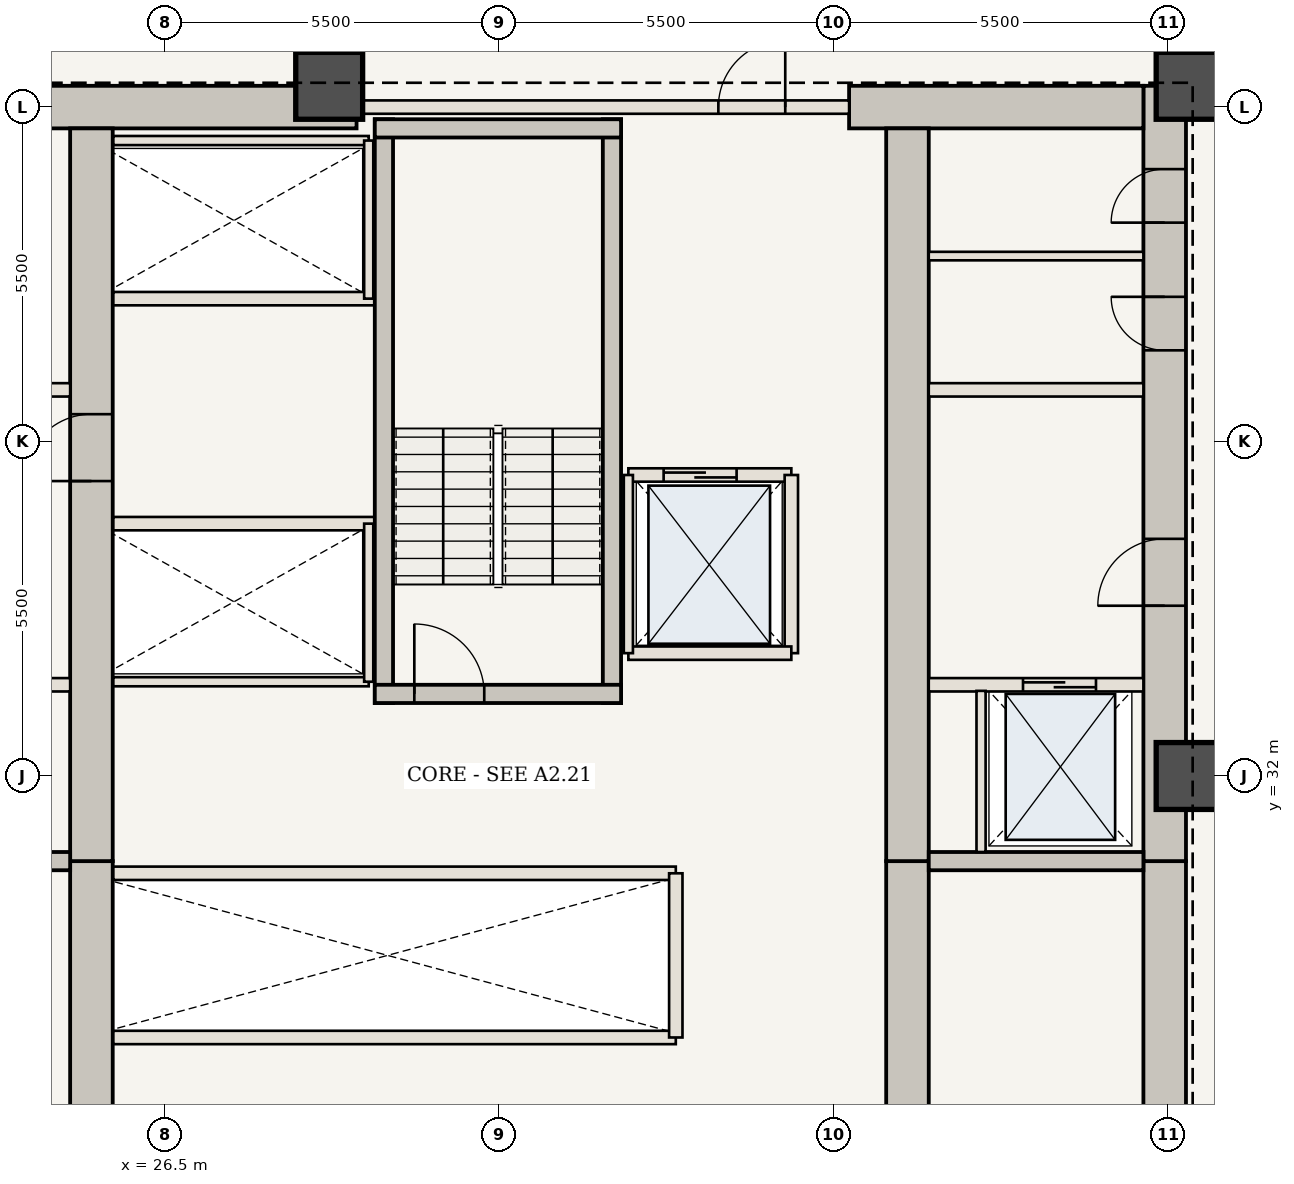
"""IFC4 building model, lengths in metres.
Left out: names, types, materials, properties, quantities, classifications, styles, units other than length and angle.
Written with IfcOpenShell. Run it as: python <this file> out.ifc"""

import sys

from ifc_helpers import new_model, si_unit, direction, frame, frame_2d, origin, origin_2d, place, context, subcontext, project, spatial, rectangle, extrude, element, fill, save


model = new_model("IFC4")
c1 = context("Model", 3, precision=1e-05, world=origin(), true_north=direction((0.0, 1.0)))
c2 = subcontext(c1, "Body", "Model", "MODEL_VIEW")
j1 = project(units=[si_unit("LENGTHUNIT", "METRE"), si_unit("PLANEANGLEUNIT", "RADIAN")], contexts=[c1])
p1 = place(None, origin())
s1 = spatial("IfcSite", under=j1, at=p1, CompositionType="ELEMENT")
p2 = place(p1, origin())
s2 = spatial("IfcBuilding", under=s1, at=p2, CompositionType="ELEMENT")
p3 = place(p2, frame((0.0, 0.0, 82.25)))
s3 = spatial("IfcBuildingStorey", under=s2, at=p3, CompositionType="ELEMENT", Elevation=82.25)
p4 = place(p3, frame((42.94, 20.6, 0.0), z_axis=(0.0, 0.0, 1.0), x_axis=(0.0, 1.0, 0.0)))
e1 = element("IfcWall", 1, at=p4, inside=s3, PredefinedType="SHEAR", context=c2, shape_type="SweptSolid", body=[
    extrude(rectangle(XDim=10.0, YDim=0.7, at=frame_2d((5.0, 0.0))), origin(), (0.0, 0.0, 1.0), 3.5),
])
p5 = place(p4, frame((1.15, 0.0, 0.0)))
e2 = element("IfcOpeningElement", 2, at=p5, cuts=e1, PredefinedType="OPENING", context=c2, shape_type="SweptSolid", body=[
    extrude(rectangle(XDim=1.15, YDim=2.15, at=frame_2d((0.575, 1.075))), frame((0.0, 0.36, 0.0), z_axis=(0.0, -1.0, 0.0), x_axis=(1.0, 0.0, 0.0)), (0.0, 0.0, 1.0), 0.72),
])
p6 = place(p3, frame((42.94, 30.6, 0.0), z_axis=(0.0, 0.0, 1.0), x_axis=(0.0, 1.0, 0.0)))
e3 = element("IfcWall", 3, at=p6, inside=s3, PredefinedType="SHEAR", context=c2, shape_type="SweptSolid", body=[
    extrude(rectangle(XDim=12.75, YDim=0.7, at=frame_2d((6.375, 0.0))), origin(), (0.0, 0.0, 1.0), 3.5),
])
p7 = place(p6, frame((4.2, 0.0, 0.0)))
e4 = element("IfcOpeningElement", 4, at=p7, cuts=e3, PredefinedType="OPENING", context=c2, shape_type="SweptSolid", body=[
    extrude(rectangle(XDim=1.1, YDim=2.15, at=frame_2d((0.55, 1.075))), frame((0.0, 0.36, 0.0), z_axis=(0.0, -1.0, 0.0), x_axis=(1.0, 0.0, 0.0)), (0.0, 0.0, 1.0), 0.72),
])
p8 = place(p6, frame((8.4, 0.0, 0.0)))
e5 = element("IfcOpeningElement", 5, at=p8, cuts=e3, PredefinedType="OPENING", context=c2, shape_type="SweptSolid", body=[
    extrude(rectangle(XDim=0.88, YDim=2.1, at=frame_2d((0.44, 1.05))), frame((0.0, 0.36, 0.0), z_axis=(0.0, -1.0, 0.0), x_axis=(1.0, 0.0, 0.0)), (0.0, 0.0, 1.0), 0.72),
])
p9 = place(p6, frame((10.5, 0.0, 0.0)))
e6 = element("IfcOpeningElement", 6, at=p9, cuts=e3, PredefinedType="OPENING", context=c2, shape_type="SweptSolid", body=[
    extrude(rectangle(XDim=0.88, YDim=2.1, at=frame_2d((0.44, 1.05))), frame((0.0, 0.36, 0.0), z_axis=(0.0, -1.0, 0.0), x_axis=(1.0, 0.0, 0.0)), (0.0, 0.0, 1.0), 0.72),
])
p10 = place(p3, frame((21.41, 43.0, 0.0), z_axis=(0.0, 0.0, 1.0), x_axis=(1.0, 0.0, 0.0)))
e7 = element("IfcWall", 7, at=p10, inside=s3, PredefinedType="SHEAR", context=c2, shape_type="SweptSolid", body=[
    extrude(rectangle(XDim=8.24, YDim=0.7, at=frame_2d((4.12, 0.0))), origin(), (0.0, 0.0, 1.0), 3.5),
])
p11 = place(p3, frame((37.75, 43.0, 0.0), z_axis=(0.0, 0.0, 1.0), x_axis=(1.0, 0.0, 0.0)))
e8 = element("IfcWall", 8, at=p11, inside=s3, PredefinedType="SHEAR", context=c2, shape_type="SweptSolid", body=[
    extrude(rectangle(XDim=4.84, YDim=0.7, at=frame_2d((2.42, 0.0))), origin(), (0.0, 0.0, 1.0), 3.5),
])
p12 = place(p3, frame((25.29, 21.3, 0.0), z_axis=(0.0, 0.0, 1.0), x_axis=(0.0, 1.0, 0.0)))
e9 = element("IfcWall", 9, at=p12, inside=s3, PredefinedType="SHEAR", context=c2, shape_type="SweptSolid", body=[
    extrude(rectangle(XDim=9.3, YDim=0.7, at=frame_2d((4.65, 0.0))), origin(), (0.0, 0.0, 1.0), 3.5),
])
p13 = place(p3, frame((25.29, 30.6, 0.0), z_axis=(0.0, 0.0, 1.0), x_axis=(0.0, 1.0, 0.0)))
e10 = element("IfcWall", 10, at=p13, inside=s3, PredefinedType="SHEAR", context=c2, shape_type="SweptSolid", body=[
    extrude(rectangle(XDim=12.05, YDim=0.7, at=frame_2d((6.025, 0.0))), origin(), (0.0, 0.0, 1.0), 3.5),
])
p14 = place(p13, frame((6.25, 0.0, 0.0)))
e11 = element("IfcOpeningElement", 11, at=p14, cuts=e10, PredefinedType="OPENING", context=c2, shape_type="SweptSolid", body=[
    extrude(rectangle(XDim=1.1, YDim=2.15, at=frame_2d((0.55, 1.075))), frame((0.0, 0.36, 0.0), z_axis=(0.0, -1.0, 0.0), x_axis=(1.0, 0.0, 0.0)), (0.0, 0.0, 1.0), 0.72),
])
p15 = place(p3, frame((38.71, 21.3, 0.0), z_axis=(0.0, 0.0, 1.0), x_axis=(0.0, 1.0, 0.0)))
e12 = element("IfcWall", 12, at=p15, inside=s3, PredefinedType="SHEAR", context=c2, shape_type="SweptSolid", body=[
    extrude(rectangle(XDim=9.3, YDim=0.7, at=frame_2d((4.65, 0.0))), origin(), (0.0, 0.0, 1.0), 3.5),
])
p16 = place(p3, frame((38.71, 30.6, 0.0), z_axis=(0.0, 0.0, 1.0), x_axis=(0.0, 1.0, 0.0)))
e13 = element("IfcWall", 13, at=p16, inside=s3, PredefinedType="SHEAR", context=c2, shape_type="SweptSolid", body=[
    extrude(rectangle(XDim=12.05, YDim=0.7, at=frame_2d((6.025, 0.0))), origin(), (0.0, 0.0, 1.0), 3.5),
])
for number, where, z_axis, x_axis in (
    (14, (43.35, 32.0, 0.0), (0.0, 0.0, 1.0), (1.0, 0.0, 0.0)),
    (15, (43.35, 43.35, 0.0), (0.0, 0.0, 1.0), (1.0, 0.0, 0.0)),
    (16, (29.2, 43.35, 0.0), (0.0, 0.0, 1.0), (1.0, 0.0, 0.0)),
):
    element("IfcColumn", number, at=place(p3, frame(where, z_axis=z_axis, x_axis=x_axis)), inside=s3, PredefinedType="COLUMN", context=c2, shape_type="SweptSolid", body=[
        extrude(rectangle(XDim=1.1, YDim=1.1, at=origin_2d()), origin(), (0.0, 0.0, 1.0), 3.5),
    ])
for number, where, z_axis, x_axis in (
    (17, (21.41, 30.6, 0.0), (0.0, 0.0, 1.0), (1.0, 0.0, 0.0)),
    (18, (39.06, 30.6, 0.0), (0.0, 0.0, 1.0), (1.0, 0.0, 0.0)),
):
    element("IfcWall", number, at=place(p3, frame(where, z_axis=z_axis, x_axis=x_axis)), inside=s3, PredefinedType="SHEAR", context=c2, shape_type="SweptSolid", body=[
        extrude(rectangle(XDim=3.53, YDim=0.3, at=frame_2d((1.765, 0.0))), origin(), (0.0, 0.0, 1.0), 3.32),
    ])
p17 = place(p3, frame((21.41, 33.5, 0.0), z_axis=(0.0, 0.0, 1.0), x_axis=(1.0, 0.0, 0.0)))
e19 = element("IfcWall", 19, at=p17, inside=s3, PredefinedType="STANDARD", context=c2, shape_type="SweptSolid", body=[
    extrude(rectangle(XDim=3.53, YDim=0.22, at=frame_2d((1.765, 0.0))), origin(), (0.0, 0.0, 1.0), 3.32),
])
p18 = place(p17, frame((0.75, 0.0, 0.0)))
e20 = element("IfcOpeningElement", 20, at=p18, cuts=e19, PredefinedType="OPENING", context=c2, shape_type="SweptSolid", body=[
    extrude(rectangle(XDim=1.2, YDim=2.2, at=frame_2d((0.6, 1.1))), frame((0.0, 0.12, 0.0), z_axis=(0.0, -1.0, 0.0), x_axis=(1.0, 0.0, 0.0)), (0.0, 0.0, 1.0), 0.24),
])
p19 = place(p3, frame((39.06, 33.5, 0.0), z_axis=(0.0, 0.0, 1.0), x_axis=(1.0, 0.0, 0.0)))
e21 = element("IfcWall", 21, at=p19, inside=s3, PredefinedType="STANDARD", context=c2, shape_type="SweptSolid", body=[
    extrude(rectangle(XDim=3.53, YDim=0.22, at=frame_2d((1.765, 0.0))), origin(), (0.0, 0.0, 1.0), 3.32),
])
p20 = place(p19, frame((1.55, 0.0, 0.0)))
e22 = element("IfcOpeningElement", 22, at=p20, cuts=e21, PredefinedType="OPENING", context=c2, shape_type="SweptSolid", body=[
    extrude(rectangle(XDim=1.2, YDim=2.2, at=frame_2d((0.6, 1.1))), frame((0.0, 0.12, 0.0), z_axis=(0.0, -1.0, 0.0), x_axis=(1.0, 0.0, 0.0)), (0.0, 0.0, 1.0), 0.24),
])
p21 = place(p3, frame((39.92, 30.75, 0.0), z_axis=(0.0, 0.0, 1.0), x_axis=(0.0, 1.0, 0.0)))
e23 = element("IfcWall", 23, at=p21, inside=s3, PredefinedType="STANDARD", context=c2, shape_type="SweptSolid", body=[
    extrude(rectangle(XDim=2.65, YDim=0.15, at=frame_2d((1.325, 0.0))), origin(), (0.0, 0.0, 1.0), 3.32),
])
for number, where, z_axis, x_axis in (
    (24, (21.41, 38.35, 0.0), (0.0, 0.0, 1.0), (1.0, 0.0, 0.0)),
    (25, (39.06, 38.35, 0.0), (0.0, 0.0, 1.0), (1.0, 0.0, 0.0)),
):
    element("IfcWall", number, at=place(p3, frame(where, z_axis=z_axis, x_axis=x_axis)), inside=s3, PredefinedType="STANDARD", context=c2, shape_type="SweptSolid", body=[
        extrude(rectangle(XDim=3.53, YDim=0.22, at=frame_2d((1.765, 0.0))), origin(), (0.0, 0.0, 1.0), 3.32),
    ])
p22 = place(p3, frame((39.06, 40.55, 0.0), z_axis=(0.0, 0.0, 1.0), x_axis=(1.0, 0.0, 0.0)))
e26 = element("IfcWall", 26, at=p22, inside=s3, PredefinedType="STANDARD", context=c2, shape_type="SweptSolid", body=[
    extrude(rectangle(XDim=3.53, YDim=0.14, at=frame_2d((1.765, 0.0))), origin(), (0.0, 0.0, 1.0), 3.32),
])
for number, where, z_axis, x_axis in (
    (27, (25.65, 27.7, 0.0), (0.0, 0.0, 1.0), (1.0, 0.0, 0.0)),
    (28, (25.65, 30.4, 0.0), (0.0, 0.0, 1.0), (1.0, 0.0, 0.0)),
):
    element("IfcWall", number, at=place(p3, frame(where, z_axis=z_axis, x_axis=x_axis)), inside=s3, PredefinedType="STANDARD", context=c2, shape_type="SweptSolid", body=[
        extrude(rectangle(XDim=9.25, YDim=0.22, at=frame_2d((4.625, 0.0))), origin(), (0.0, 0.0, 1.0), 3.32),
    ])
p23 = place(p3, frame((34.9, 27.7, 0.0), z_axis=(0.0, 0.0, 1.0), x_axis=(0.0, 1.0, 0.0)))
e29 = element("IfcWall", 29, at=p23, inside=s3, PredefinedType="STANDARD", context=c2, shape_type="SweptSolid", body=[
    extrude(rectangle(XDim=2.7, YDim=0.22, at=frame_2d((1.35, 0.0))), origin(), (0.0, 0.0, 1.0), 3.32),
])
p24 = place(p3, frame((25.65, 36.15, 0.0), z_axis=(0.0, 0.0, 1.0), x_axis=(1.0, 0.0, 0.0)))
e30 = element("IfcWall", 30, at=p24, inside=s3, PredefinedType="STANDARD", context=c2, shape_type="SweptSolid", body=[
    extrude(rectangle(XDim=4.3, YDim=0.22, at=frame_2d((2.15, 0.0))), origin(), (0.0, 0.0, 1.0), 3.32),
])
p25 = place(p3, frame((25.65, 33.55, 0.0), z_axis=(0.0, 0.0, 1.0), x_axis=(1.0, 0.0, 0.0)))
e31 = element("IfcWall", 31, at=p25, inside=s3, PredefinedType="STANDARD", context=c2, shape_type="SweptSolid", body=[
    extrude(rectangle(XDim=4.2, YDim=0.15, at=frame_2d((2.1, 0.0))), origin(), (0.0, 0.0, 1.0), 3.32),
])
p26 = place(p3, frame((29.85, 33.55, 0.0), z_axis=(0.0, 0.0, 1.0), x_axis=(0.0, 1.0, 0.0)))
e32 = element("IfcWall", 32, at=p26, inside=s3, PredefinedType="STANDARD", context=c2, shape_type="SweptSolid", body=[
    extrude(rectangle(XDim=2.6, YDim=0.15, at=frame_2d((1.3, 0.0))), origin(), (0.0, 0.0, 1.0), 3.32),
])
p27 = place(p3, frame((25.65, 39.85, 0.0), z_axis=(0.0, 0.0, 1.0), x_axis=(1.0, 0.0, 0.0)))
e33 = element("IfcWall", 33, at=p27, inside=s3, PredefinedType="STANDARD", context=c2, shape_type="SweptSolid", body=[
    extrude(rectangle(XDim=4.3, YDim=0.22, at=frame_2d((2.15, 0.0))), origin(), (0.0, 0.0, 1.0), 3.32),
])
p28 = place(p3, frame((25.65, 42.45, 0.0), z_axis=(0.0, 0.0, 1.0), x_axis=(1.0, 0.0, 0.0)))
e34 = element("IfcWall", 34, at=p28, inside=s3, PredefinedType="STANDARD", context=c2, shape_type="SweptSolid", body=[
    extrude(rectangle(XDim=4.2, YDim=0.15, at=frame_2d((2.1, 0.0))), origin(), (0.0, 0.0, 1.0), 3.32),
])
p29 = place(p3, frame((29.85, 39.85, 0.0), z_axis=(0.0, 0.0, 1.0), x_axis=(0.0, 1.0, 0.0)))
e35 = element("IfcWall", 35, at=p29, inside=s3, PredefinedType="STANDARD", context=c2, shape_type="SweptSolid", body=[
    extrude(rectangle(XDim=2.6, YDim=0.15, at=frame_2d((1.3, 0.0))), origin(), (0.0, 0.0, 1.0), 3.32),
])
for number, where, z_axis, x_axis in (
    (36, (30.1, 33.2, 0.0), (0.0, 0.0, 1.0), (0.0, 1.0, 0.0)),
    (37, (33.85, 33.2, 0.0), (0.0, 0.0, 1.0), (0.0, 1.0, 0.0)),
):
    element("IfcWall", number, at=place(p3, frame(where, z_axis=z_axis, x_axis=x_axis)), inside=s3, PredefinedType="SHEAR", context=c2, shape_type="SweptSolid", body=[
        extrude(rectangle(XDim=9.6, YDim=0.3, at=frame_2d((4.8, 0.0))), origin(), (0.0, 0.0, 1.0), 3.32),
    ])
p30 = place(p3, frame((29.95, 33.35, 0.0), z_axis=(0.0, 0.0, 1.0), x_axis=(1.0, 0.0, 0.0)))
e38 = element("IfcWall", 38, at=p30, inside=s3, PredefinedType="SHEAR", context=c2, shape_type="SweptSolid", body=[
    extrude(rectangle(XDim=4.05, YDim=0.3, at=frame_2d((2.025, 0.0))), origin(), (0.0, 0.0, 1.0), 3.32),
])
p31 = place(p30, frame((0.65, 0.0, 0.0)))
e39 = element("IfcOpeningElement", 39, at=p31, cuts=e38, PredefinedType="OPENING", context=c2, shape_type="SweptSolid", body=[
    extrude(rectangle(XDim=1.15, YDim=2.15, at=frame_2d((0.575, 1.075))), frame((0.0, 0.16, 0.0), z_axis=(0.0, -1.0, 0.0), x_axis=(1.0, 0.0, 0.0)), (0.0, 0.0, 1.0), 0.32),
])
p32 = place(p3, frame((29.95, 42.65, 0.0), z_axis=(0.0, 0.0, 1.0), x_axis=(1.0, 0.0, 0.0)))
e40 = element("IfcWall", 40, at=p32, inside=s3, PredefinedType="SHEAR", context=c2, shape_type="SweptSolid", body=[
    extrude(rectangle(XDim=4.05, YDim=0.3, at=frame_2d((2.025, 0.0))), origin(), (0.0, 0.0, 1.0), 3.32),
])
p33 = place(p3, frame((29.65, 43.0, 0.0), z_axis=(0.0, 0.0, 1.0), x_axis=(1.0, 0.0, 0.0)))
e41 = element("IfcWall", 41, at=p33, inside=s3, PredefinedType="STANDARD", context=c2, shape_type="SweptSolid", body=[
    extrude(rectangle(XDim=8.1, YDim=0.22, at=frame_2d((4.05, 0.0))), origin(), (0.0, 0.0, 1.0), 3.32),
])
p34 = place(p33, frame((5.95, 0.0, 0.0)))
e42 = element("IfcOpeningElement", 42, at=p34, cuts=e41, PredefinedType="OPENING", context=c2, shape_type="SweptSolid", body=[
    extrude(rectangle(XDim=1.1, YDim=2.15, at=frame_2d((0.55, 1.075))), frame((0.0, 0.12, 0.0), z_axis=(0.0, -1.0, 0.0), x_axis=(1.0, 0.0, 0.0)), (0.0, 0.0, 1.0), 0.24),
])
p35 = place(p3, frame((34.12, 36.95, 0.0), z_axis=(0.0, 0.0, 1.0), x_axis=(1.0, 0.0, 0.0)))
e43 = element("IfcWall", 43, at=p35, inside=s3, PredefinedType="STANDARD", context=c2, shape_type="SweptSolid", body=[
    extrude(rectangle(XDim=2.68, YDim=0.22, at=frame_2d((1.34, 0.0))), origin(), (0.0, 0.0, 1.0), 3.32),
])
p36 = place(p35, frame((0.58, 0.0, 0.0)))
e44 = element("IfcOpeningElement", 44, at=p36, cuts=e43, PredefinedType="OPENING", context=c2, shape_type="SweptSolid", body=[
    extrude(rectangle(XDim=1.2, YDim=2.2, at=frame_2d((0.6, 1.1))), frame((0.0, 0.12, 0.0), z_axis=(0.0, -1.0, 0.0), x_axis=(1.0, 0.0, 0.0)), (0.0, 0.0, 1.0), 0.24),
])
p37 = place(p3, frame((36.8, 34.02, 0.0), z_axis=(0.0, 0.0, 1.0), x_axis=(0.0, 1.0, 0.0)))
e45 = element("IfcWall", 45, at=p37, inside=s3, PredefinedType="STANDARD", context=c2, shape_type="SweptSolid", body=[
    extrude(rectangle(XDim=2.93, YDim=0.22, at=frame_2d((1.465, 0.0))), origin(), (0.0, 0.0, 1.0), 3.32),
])
p38 = place(p3, frame((34.12, 34.02, 0.0), z_axis=(0.0, 0.0, 1.0), x_axis=(1.0, 0.0, 0.0)))
e46 = element("IfcWall", 46, at=p38, inside=s3, PredefinedType="STANDARD", context=c2, shape_type="SweptSolid", body=[
    extrude(rectangle(XDim=2.68, YDim=0.22, at=frame_2d((1.34, 0.0))), origin(), (0.0, 0.0, 1.0), 3.32),
])
p39 = place(p3, frame((34.12, 34.02, 0.0), z_axis=(0.0, 0.0, 1.0), x_axis=(0.0, 1.0, 0.0)))
e47 = element("IfcWall", 47, at=p39, inside=s3, PredefinedType="STANDARD", context=c2, shape_type="SweptSolid", body=[
    extrude(rectangle(XDim=2.93, YDim=0.15, at=frame_2d((1.465, 0.0))), origin(), (0.0, 0.0, 1.0), 3.32),
])
p40 = place(p7, origin())
e48 = element("IfcDoor", 48, at=p40, inside=s3, OperationType="SINGLE_SWING_LEFT", PredefinedType="DOOR", context=c2, shape_type="SweptSolid", body=[
    extrude(rectangle(XDim=1.1, YDim=2.15, at=frame_2d((0.55, 1.075))), frame((0.0, 0.025, 0.0), z_axis=(0.0, -1.0, 0.0), x_axis=(1.0, 0.0, 0.0)), (0.0, 0.0, 1.0), 0.05),
])
fill(e4, e48)
p41 = place(p14, origin())
e49 = element("IfcDoor", 49, at=p41, inside=s3, OperationType="SINGLE_SWING_LEFT", PredefinedType="DOOR", context=c2, shape_type="SweptSolid", body=[
    extrude(rectangle(XDim=1.1, YDim=2.15, at=frame_2d((0.55, 1.075))), frame((0.0, 0.025, 0.0), z_axis=(0.0, -1.0, 0.0), x_axis=(1.0, 0.0, 0.0)), (0.0, 0.0, 1.0), 0.05),
])
fill(e11, e49)
p42 = place(p8, origin())
e50 = element("IfcDoor", 50, at=p42, inside=s3, OperationType="SINGLE_SWING_RIGHT", PredefinedType="DOOR", context=c2, shape_type="SweptSolid", body=[
    extrude(rectangle(XDim=0.88, YDim=2.1, at=frame_2d((0.44, 1.05))), frame((0.0, 0.025, 0.0), z_axis=(0.0, -1.0, 0.0), x_axis=(1.0, 0.0, 0.0)), (0.0, 0.0, 1.0), 0.05),
])
fill(e5, e50)
p43 = place(p9, origin())
e51 = element("IfcDoor", 51, at=p43, inside=s3, OperationType="SINGLE_SWING_LEFT", PredefinedType="DOOR", context=c2, shape_type="SweptSolid", body=[
    extrude(rectangle(XDim=0.88, YDim=2.1, at=frame_2d((0.44, 1.05))), frame((0.0, 0.025, 0.0), z_axis=(0.0, -1.0, 0.0), x_axis=(1.0, 0.0, 0.0)), (0.0, 0.0, 1.0), 0.05),
])
fill(e6, e51)
p44 = place(p20, origin())
e52 = element("IfcDoor", 52, at=p44, inside=s3, OperationType="DOUBLE_DOOR_SLIDING", PredefinedType="DOOR", context=c2, shape_type="SweptSolid", body=[
    extrude(rectangle(XDim=1.2, YDim=2.2, at=frame_2d((0.6, 1.1))), frame((0.0, 0.025, 0.0), z_axis=(0.0, -1.0, 0.0), x_axis=(1.0, 0.0, 0.0)), (0.0, 0.0, 1.0), 0.05),
])
fill(e22, e52)
p45 = place(p31, origin())
e53 = element("IfcDoor", 53, at=p45, inside=s3, OperationType="SINGLE_SWING_LEFT", PredefinedType="DOOR", context=c2, shape_type="SweptSolid", body=[
    extrude(rectangle(XDim=1.15, YDim=2.15, at=frame_2d((0.575, 1.075))), frame((0.0, 0.025, 0.0), z_axis=(0.0, -1.0, 0.0), x_axis=(1.0, 0.0, 0.0)), (0.0, 0.0, 1.0), 0.05),
])
fill(e39, e53)
p46 = place(p34, origin())
e54 = element("IfcDoor", 54, at=p46, inside=s3, OperationType="SINGLE_SWING_RIGHT", PredefinedType="DOOR", context=c2, shape_type="SweptSolid", body=[
    extrude(rectangle(XDim=1.1, YDim=2.15, at=frame_2d((0.55, 1.075))), frame((0.0, 0.025, 0.0), z_axis=(0.0, -1.0, 0.0), x_axis=(1.0, 0.0, 0.0)), (0.0, 0.0, 1.0), 0.05),
])
fill(e42, e54)
p47 = place(p36, origin())
e55 = element("IfcDoor", 55, at=p47, inside=s3, OperationType="DOUBLE_DOOR_SLIDING", PredefinedType="DOOR", context=c2, shape_type="SweptSolid", body=[
    extrude(rectangle(XDim=1.2, YDim=2.2, at=frame_2d((0.6, 1.1))), frame((0.0, 0.025, 0.0), z_axis=(0.0, -1.0, 0.0), x_axis=(1.0, 0.0, 0.0)), (0.0, 0.0, 1.0), 0.05),
])
fill(e44, e55)
save(model, sys.argv[1])
